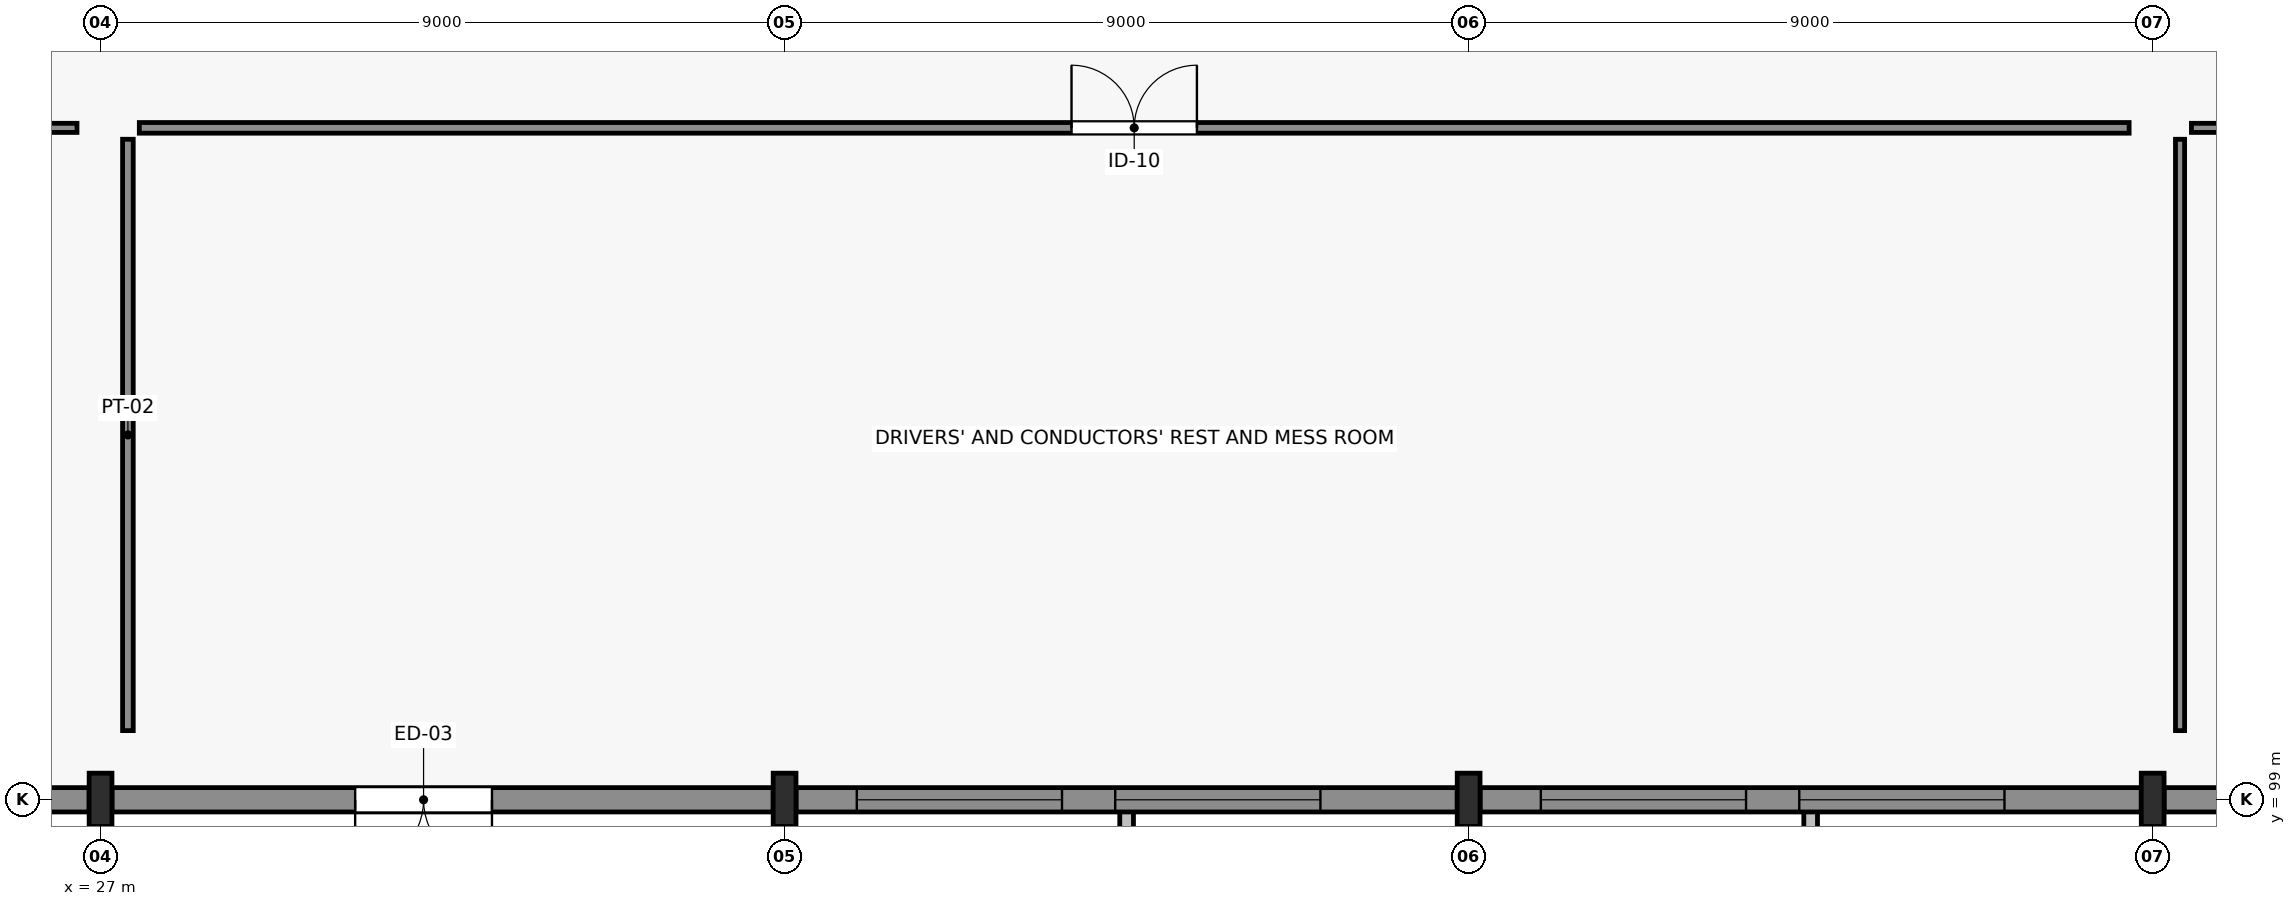
"""IFC4 building model, lengths in metres.
Left out: names, types, materials, properties, quantities, classifications, styles, units other than length and angle.
Written with IfcOpenShell. Run it as: python <this file> out.ifc"""

import sys

from ifc_helpers import new_model, si_unit, direction, frame, frame_2d, origin, origin_2d, place, context, subcontext, project, spatial, rectangle, i_section, extrude, element, fill, save


model = new_model("IFC4")
c1 = context("Model", 3, precision=1e-05, world=origin(), true_north=direction((0.0, 1.0)))
c2 = subcontext(c1, "Body", "Model", "MODEL_VIEW")
j1 = project(units=[si_unit("LENGTHUNIT", "METRE"), si_unit("PLANEANGLEUNIT", "RADIAN")], contexts=[c1])
p1 = place(None, origin())
s1 = spatial("IfcSite", under=j1, at=p1, CompositionType="ELEMENT")
p2 = place(p1, origin())
s2 = spatial("IfcBuilding", under=s1, at=p2, CompositionType="ELEMENT")
p3 = place(p2, frame((0.0, 0.0, 4.8)))
s3 = spatial("IfcBuildingStorey", under=s2, at=p3, CompositionType="ELEMENT", Elevation=4.8)
for number, where, z_axis, x_axis in (
    (1, (27.0, 99.0, 0.0), (0.0, 0.0, 1.0), (1.0, 0.0, 0.0)),
    (2, (36.0, 99.0, 0.0), (0.0, 0.0, 1.0), (1.0, 0.0, 0.0)),
    (3, (45.0, 99.0, 0.0), (0.0, 0.0, 1.0), (1.0, 0.0, 0.0)),
    (4, (54.0, 99.0, 0.0), (0.0, 0.0, 1.0), (1.0, 0.0, 0.0)),
):
    element("IfcColumn", number, at=place(p3, frame(where, z_axis=z_axis, x_axis=x_axis)), inside=s3, PredefinedType="COLUMN", context=c2, shape_type="SweptSolid", body=[
        extrude(i_section(OverallWidth=0.3, OverallDepth=0.7, WebThickness=0.017, FlangeThickness=0.032, FilletRadius=0.027, at=origin_2d()), origin(), (0.0, 0.0, 1.0), 4.82),
    ])
p4 = place(p3, frame((26.85, 99.0, 0.0), z_axis=(0.0, 0.0, 1.0), x_axis=(-1.0, 0.0, 0.0)))
e5 = element("IfcWall", 5, at=p4, inside=s3, PredefinedType="SOLIDWALL", context=c2, shape_type="SweptSolid", body=[
    extrude(rectangle(XDim=8.7, YDim=0.32, at=frame_2d((4.35, 0.0))), origin(), (0.0, 0.0, 1.0), 4.35),
])
p5 = place(p4, frame((1.8, 0.0, 1.05)))
e6 = element("IfcOpeningElement", 6, at=p5, cuts=e5, PredefinedType="OPENING", context=c2, shape_type="SweptSolid", body=[
    extrude(rectangle(XDim=2.7, YDim=1.8, at=frame_2d((1.35, 0.9))), frame((0.0, 0.17, 0.0), z_axis=(0.0, -1.0, 0.0), x_axis=(1.0, 0.0, 0.0)), (0.0, 0.0, 1.0), 0.34),
])
p6 = place(p4, frame((5.2, 0.0, 1.05)))
e7 = element("IfcOpeningElement", 7, at=p6, cuts=e5, PredefinedType="OPENING", context=c2, shape_type="SweptSolid", body=[
    extrude(rectangle(XDim=2.7, YDim=1.8, at=frame_2d((1.35, 0.9))), frame((0.0, 0.17, 0.0), z_axis=(0.0, -1.0, 0.0), x_axis=(1.0, 0.0, 0.0)), (0.0, 0.0, 1.0), 0.34),
])
p7 = place(p3, frame((35.85, 99.0, 0.0), z_axis=(0.0, 0.0, 1.0), x_axis=(-1.0, 0.0, 0.0)))
e8 = element("IfcWall", 8, at=p7, inside=s3, PredefinedType="SOLIDWALL", context=c2, shape_type="SweptSolid", body=[
    extrude(rectangle(XDim=8.7, YDim=0.32, at=frame_2d((4.35, 0.0))), origin(), (0.0, 0.0, 1.0), 4.35),
])
p8 = place(p7, frame((3.7, 0.0, 0.0)))
e9 = element("IfcOpeningElement", 9, at=p8, cuts=e8, PredefinedType="OPENING", context=c2, shape_type="SweptSolid", body=[
    extrude(rectangle(XDim=1.8, YDim=2.3, at=frame_2d((0.9, 1.15))), frame((0.0, 0.17, 0.0), z_axis=(0.0, -1.0, 0.0), x_axis=(1.0, 0.0, 0.0)), (0.0, 0.0, 1.0), 0.34),
])
p9 = place(p3, frame((44.85, 99.0, 0.0), z_axis=(0.0, 0.0, 1.0), x_axis=(-1.0, 0.0, 0.0)))
e10 = element("IfcWall", 10, at=p9, inside=s3, PredefinedType="SOLIDWALL", context=c2, shape_type="SweptSolid", body=[
    extrude(rectangle(XDim=8.7, YDim=0.32, at=frame_2d((4.35, 0.0))), origin(), (0.0, 0.0, 1.0), 4.35),
])
p10 = place(p9, frame((1.8, 0.0, 1.05)))
e11 = element("IfcOpeningElement", 11, at=p10, cuts=e10, PredefinedType="OPENING", context=c2, shape_type="SweptSolid", body=[
    extrude(rectangle(XDim=2.7, YDim=1.8, at=frame_2d((1.35, 0.9))), frame((0.0, 0.17, 0.0), z_axis=(0.0, -1.0, 0.0), x_axis=(1.0, 0.0, 0.0)), (0.0, 0.0, 1.0), 0.34),
])
p11 = place(p9, frame((5.2, 0.0, 1.05)))
e12 = element("IfcOpeningElement", 12, at=p11, cuts=e10, PredefinedType="OPENING", context=c2, shape_type="SweptSolid", body=[
    extrude(rectangle(XDim=2.7, YDim=1.8, at=frame_2d((1.35, 0.9))), frame((0.0, 0.17, 0.0), z_axis=(0.0, -1.0, 0.0), x_axis=(1.0, 0.0, 0.0)), (0.0, 0.0, 1.0), 0.34),
])
p12 = place(p3, frame((53.85, 99.0, 0.0), z_axis=(0.0, 0.0, 1.0), x_axis=(-1.0, 0.0, 0.0)))
e13 = element("IfcWall", 13, at=p12, inside=s3, PredefinedType="SOLIDWALL", context=c2, shape_type="SweptSolid", body=[
    extrude(rectangle(XDim=8.7, YDim=0.32, at=frame_2d((4.35, 0.0))), origin(), (0.0, 0.0, 1.0), 4.35),
])
p13 = place(p12, frame((1.8, 0.0, 1.05)))
e14 = element("IfcOpeningElement", 14, at=p13, cuts=e13, PredefinedType="OPENING", context=c2, shape_type="SweptSolid", body=[
    extrude(rectangle(XDim=2.7, YDim=1.8, at=frame_2d((1.35, 0.9))), frame((0.0, 0.17, 0.0), z_axis=(0.0, -1.0, 0.0), x_axis=(1.0, 0.0, 0.0)), (0.0, 0.0, 1.0), 0.34),
])
p14 = place(p12, frame((5.2, 0.0, 1.05)))
e15 = element("IfcOpeningElement", 15, at=p14, cuts=e13, PredefinedType="OPENING", context=c2, shape_type="SweptSolid", body=[
    extrude(rectangle(XDim=2.7, YDim=1.8, at=frame_2d((1.35, 0.9))), frame((0.0, 0.17, 0.0), z_axis=(0.0, -1.0, 0.0), x_axis=(1.0, 0.0, 0.0)), (0.0, 0.0, 1.0), 0.34),
])
p15 = place(p3, frame((62.85, 99.0, 0.0), z_axis=(0.0, 0.0, 1.0), x_axis=(-1.0, 0.0, 0.0)))
e16 = element("IfcWall", 16, at=p15, inside=s3, PredefinedType="SOLIDWALL", context=c2, shape_type="SweptSolid", body=[
    extrude(rectangle(XDim=8.7, YDim=0.32, at=frame_2d((4.35, 0.0))), origin(), (0.0, 0.0, 1.0), 4.35),
])
p16 = place(p15, frame((1.8, 0.0, 1.05)))
e17 = element("IfcOpeningElement", 17, at=p16, cuts=e16, PredefinedType="OPENING", context=c2, shape_type="SweptSolid", body=[
    extrude(rectangle(XDim=2.7, YDim=1.8, at=frame_2d((1.35, 0.9))), frame((0.0, 0.17, 0.0), z_axis=(0.0, -1.0, 0.0), x_axis=(1.0, 0.0, 0.0)), (0.0, 0.0, 1.0), 0.34),
])
p17 = place(p15, frame((5.2, 0.0, 1.05)))
e18 = element("IfcOpeningElement", 18, at=p17, cuts=e16, PredefinedType="OPENING", context=c2, shape_type="SweptSolid", body=[
    extrude(rectangle(XDim=2.7, YDim=1.8, at=frame_2d((1.35, 0.9))), frame((0.0, 0.17, 0.0), z_axis=(0.0, -1.0, 0.0), x_axis=(1.0, 0.0, 0.0)), (0.0, 0.0, 1.0), 0.34),
])
p18 = place(p3, frame((0.81, 107.84, 0.0), z_axis=(0.0, 0.0, 1.0), x_axis=(1.0, 0.0, 0.0)))
e19 = element("IfcWall", 19, at=p18, inside=s3, PredefinedType="PARTITIONING", context=c2, shape_type="SweptSolid", body=[
    extrude(rectangle(XDim=25.88, YDim=0.12, at=frame_2d((12.94, 0.0))), origin(), (0.0, 0.0, 1.0), 4.3),
])
p19 = place(p18, frame((12.44, 0.0, 0.0)))
e20 = element("IfcOpeningElement", 20, at=p19, cuts=e19, PredefinedType="OPENING", context=c2, shape_type="SweptSolid", body=[
    extrude(rectangle(XDim=1.0, YDim=2.15, at=frame_2d((0.5, 1.075))), frame((0.0, 0.07, 0.0), z_axis=(0.0, -1.0, 0.0), x_axis=(1.0, 0.0, 0.0)), (0.0, 0.0, 1.0), 0.14),
])
p20 = place(p3, frame((27.51, 107.84, 0.0), z_axis=(0.0, 0.0, 1.0), x_axis=(1.0, 0.0, 0.0)))
e21 = element("IfcWall", 21, at=p20, inside=s3, PredefinedType="PARTITIONING", context=c2, shape_type="SweptSolid", body=[
    extrude(rectangle(XDim=26.18, YDim=0.14, at=frame_2d((13.09, 0.0))), origin(), (0.0, 0.0, 1.0), 4.3),
])
p21 = place(p20, frame((12.265, 0.0, 0.0)))
e22 = element("IfcOpeningElement", 22, at=p21, cuts=e21, PredefinedType="OPENING", context=c2, shape_type="SweptSolid", body=[
    extrude(rectangle(XDim=1.65, YDim=2.25, at=frame_2d((0.825, 1.125))), frame((0.0, 0.08, 0.0), z_axis=(0.0, -1.0, 0.0), x_axis=(1.0, 0.0, 0.0)), (0.0, 0.0, 1.0), 0.16),
])
p22 = place(p3, frame((27.36, 99.91, 0.0), z_axis=(0.0, 0.0, 1.0), x_axis=(0.0, 1.0, 0.0)))
e23 = element("IfcWall", 23, at=p22, inside=s3, PredefinedType="PARTITIONING", context=c2, shape_type="SweptSolid", body=[
    extrude(rectangle(XDim=7.78, YDim=0.14, at=frame_2d((3.89, 0.0))), origin(), (0.0, 0.0, 1.0), 4.75),
])
p23 = place(p3, frame((54.51, 107.84, 0.0), z_axis=(0.0, 0.0, 1.0), x_axis=(1.0, 0.0, 0.0)))
e24 = element("IfcWall", 24, at=p23, inside=s3, PredefinedType="PARTITIONING", context=c2, shape_type="SweptSolid", body=[
    extrude(rectangle(XDim=25.68, YDim=0.12, at=frame_2d((12.84, 0.0))), origin(), (0.0, 0.0, 1.0), 4.3),
])
p24 = place(p23, frame((12.34, 0.0, 0.0)))
e25 = element("IfcOpeningElement", 25, at=p24, cuts=e24, PredefinedType="OPENING", context=c2, shape_type="SweptSolid", body=[
    extrude(rectangle(XDim=1.0, YDim=2.15, at=frame_2d((0.5, 1.075))), frame((0.0, 0.07, 0.0), z_axis=(0.0, -1.0, 0.0), x_axis=(1.0, 0.0, 0.0)), (0.0, 0.0, 1.0), 0.14),
])
p25 = place(p3, frame((54.36, 99.91, 0.0), z_axis=(0.0, 0.0, 1.0), x_axis=(0.0, 1.0, 0.0)))
e26 = element("IfcWall", 26, at=p25, inside=s3, PredefinedType="PARTITIONING", context=c2, shape_type="SweptSolid", body=[
    extrude(rectangle(XDim=7.78, YDim=0.12, at=frame_2d((3.89, 0.0))), origin(), (0.0, 0.0, 1.0), 4.75),
])
p26 = place(p8, origin())
e27 = element("IfcDoor", 27, at=p26, inside=s3, OperationType="DOUBLE_DOOR_SINGLE_SWING", PredefinedType="DOOR", context=c2, shape_type="SweptSolid", body=[
    extrude(rectangle(XDim=1.8, YDim=2.3, at=frame_2d((0.9, 1.15))), frame((0.0, 0.025, 0.0), z_axis=(0.0, -1.0, 0.0), x_axis=(1.0, 0.0, 0.0)), (0.0, 0.0, 1.0), 0.05),
])
fill(e9, e27)
p27 = place(p10, origin())
e28 = element("IfcWindow", 28, at=p27, inside=s3, PartitioningType="SINGLE_PANEL", PredefinedType="WINDOW", context=c2, shape_type="SweptSolid", body=[
    extrude(rectangle(XDim=2.7, YDim=1.8, at=frame_2d((1.35, 0.9))), frame((0.0, 0.03, 0.0), z_axis=(0.0, -1.0, 0.0), x_axis=(1.0, 0.0, 0.0)), (0.0, 0.0, 1.0), 0.06),
])
fill(e11, e28)
p28 = place(p11, origin())
e29 = element("IfcWindow", 29, at=p28, inside=s3, PartitioningType="SINGLE_PANEL", PredefinedType="WINDOW", context=c2, shape_type="SweptSolid", body=[
    extrude(rectangle(XDim=2.7, YDim=1.8, at=frame_2d((1.35, 0.9))), frame((0.0, 0.03, 0.0), z_axis=(0.0, -1.0, 0.0), x_axis=(1.0, 0.0, 0.0)), (0.0, 0.0, 1.0), 0.06),
])
fill(e12, e29)
p29 = place(p13, origin())
e30 = element("IfcWindow", 30, at=p29, inside=s3, PartitioningType="SINGLE_PANEL", PredefinedType="WINDOW", context=c2, shape_type="SweptSolid", body=[
    extrude(rectangle(XDim=2.7, YDim=1.8, at=frame_2d((1.35, 0.9))), frame((0.0, 0.03, 0.0), z_axis=(0.0, -1.0, 0.0), x_axis=(1.0, 0.0, 0.0)), (0.0, 0.0, 1.0), 0.06),
])
fill(e14, e30)
p30 = place(p14, origin())
e31 = element("IfcWindow", 31, at=p30, inside=s3, PartitioningType="SINGLE_PANEL", PredefinedType="WINDOW", context=c2, shape_type="SweptSolid", body=[
    extrude(rectangle(XDim=2.7, YDim=1.8, at=frame_2d((1.35, 0.9))), frame((0.0, 0.03, 0.0), z_axis=(0.0, -1.0, 0.0), x_axis=(1.0, 0.0, 0.0)), (0.0, 0.0, 1.0), 0.06),
])
fill(e15, e31)
p31 = place(p21, origin())
e32 = element("IfcDoor", 32, at=p31, inside=s3, OperationType="DOUBLE_DOOR_SINGLE_SWING", PredefinedType="DOOR", context=c2, shape_type="SweptSolid", body=[
    extrude(rectangle(XDim=1.65, YDim=2.25, at=frame_2d((0.825, 1.125))), frame((0.0, 0.025, 0.0), z_axis=(0.0, -1.0, 0.0), x_axis=(1.0, 0.0, 0.0)), (0.0, 0.0, 1.0), 0.05),
])
fill(e22, e32)
save(model, sys.argv[1])
